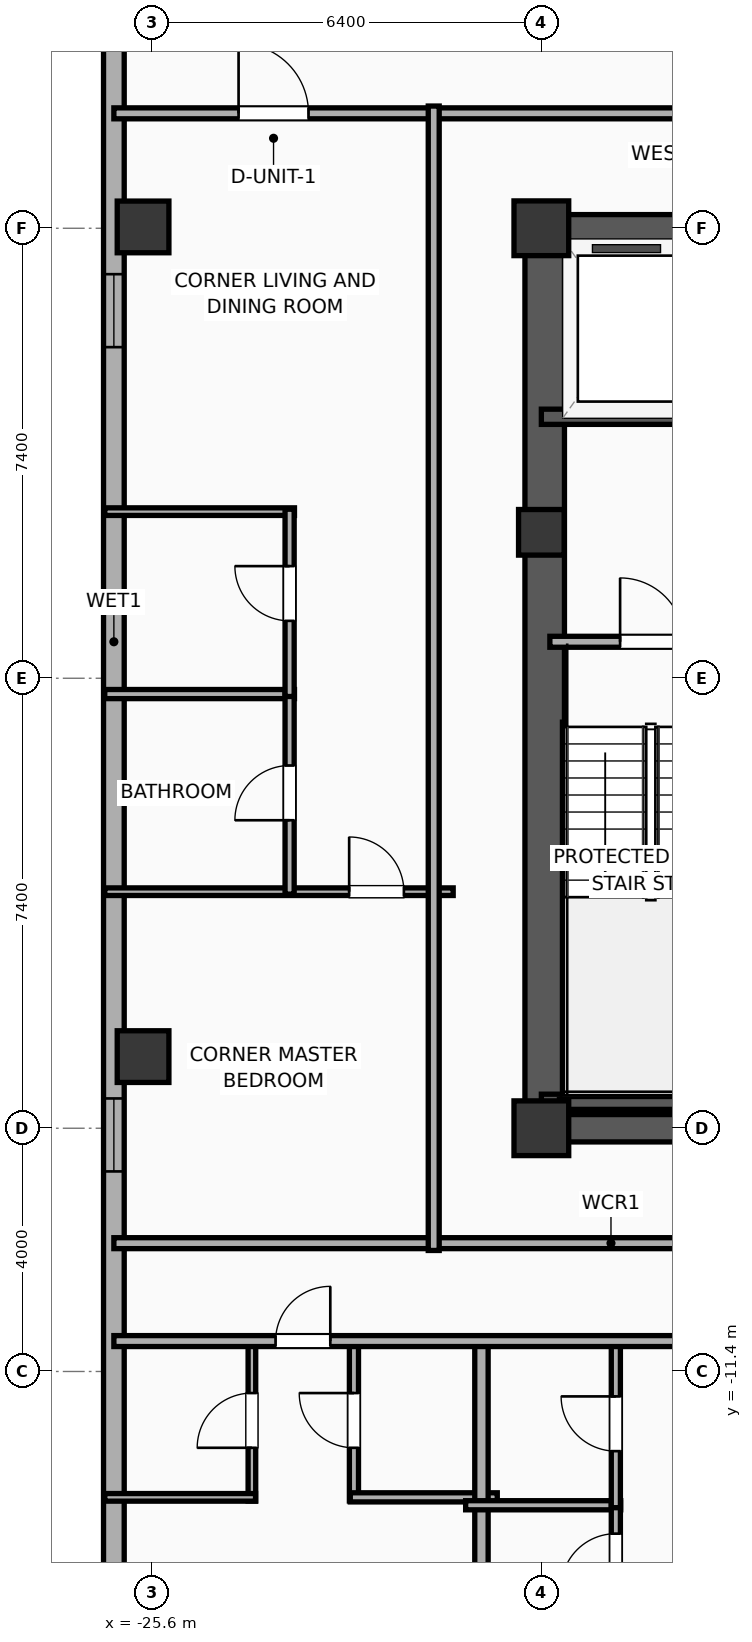
"""IFC4 building model, lengths in metres.
Left out: names, types, materials, properties, quantities, classifications, styles, units other than length and angle.
Written with IfcOpenShell. Run it as: python <this file> out.ifc"""

import sys

from ifc_helpers import new_model, si_unit, direction, frame, frame_2d, origin, origin_2d, place, context, subcontext, project, spatial, rectangle, hollow_rectangle, extrude, element, fill, save


model = new_model("IFC4")
c1 = context("Model", 3, precision=1e-05, world=origin(), true_north=direction((0.0, 1.0)))
c2 = subcontext(c1, "Body", "Model", "MODEL_VIEW")
j1 = project(units=[si_unit("LENGTHUNIT", "METRE"), si_unit("PLANEANGLEUNIT", "RADIAN")], contexts=[c1])
p1 = place(None, origin())
s1 = spatial("IfcSite", under=j1, at=p1, CompositionType="ELEMENT")
p2 = place(p1, origin())
s2 = spatial("IfcBuilding", under=s1, at=p2, CompositionType="ELEMENT")
p3 = place(p2, frame((0.0, 0.0, 243.1)))
s3 = spatial("IfcBuildingStorey", under=s2, at=p3, CompositionType="ELEMENT", Elevation=243.1)
p4 = place(p3, frame((-19.2, -7.4, 0.0), z_axis=(0.0, 0.0, 1.0), x_axis=(1.0, 0.0, 0.0)))
e1 = element("IfcColumn", 1, at=p4, inside=s3, PredefinedType="COLUMN", context=c2, shape_type="SweptSolid", body=[
    extrude(rectangle(XDim=0.9, YDim=0.9, at=origin_2d()), origin(), (0.0, 0.0, 1.0), 3.9),
])
p5 = place(p3, frame((-19.2, 2.4, 0.0), z_axis=(0.0, 0.0, 1.0), x_axis=(1.0, 0.0, 0.0)))
e2 = element("IfcColumn", 2, at=p5, inside=s3, PredefinedType="COLUMN", context=c2, shape_type="SweptSolid", body=[
    extrude(rectangle(XDim=0.75, YDim=0.75, at=origin_2d()), origin(), (0.0, 0.0, 1.0), 3.9),
])
p6 = place(p3, frame((-19.2, 7.4, 0.0), z_axis=(0.0, 0.0, 1.0), x_axis=(1.0, 0.0, 0.0)))
e3 = element("IfcColumn", 3, at=p6, inside=s3, PredefinedType="COLUMN", context=c2, shape_type="SweptSolid", body=[
    extrude(rectangle(XDim=0.9, YDim=0.9, at=origin_2d()), origin(), (0.0, 0.0, 1.0), 3.9),
])
for number, where, z_axis, x_axis in (
    (4, (-19.425, -7.4, 0.0), (0.0, 0.0, 1.0), (1.0, 0.0, 0.0)),
    (5, (-19.425, 7.4, 0.0), (0.0, 0.0, 1.0), (1.0, 0.0, 0.0)),
):
    element("IfcWall", number, at=place(p3, frame(where, z_axis=z_axis, x_axis=x_axis)), inside=s3, PredefinedType="SHEAR", context=c2, shape_type="SweptSolid", body=[
        extrude(rectangle(XDim=7.25, YDim=0.45, at=frame_2d((3.625, 0.0))), origin(), (0.0, 0.0, 1.0), 3.65),
    ])
p7 = place(p3, frame((-19.145, -7.4, 0.0), z_axis=(0.0, 0.0, 1.0), x_axis=(0.0, 1.0, 0.0)))
e6 = element("IfcWall", 6, at=p7, inside=s3, PredefinedType="SHEAR", context=c2, shape_type="SweptSolid", body=[
    extrude(rectangle(XDim=14.8, YDim=0.65, at=frame_2d((7.4, 0.0))), origin(), (0.0, 0.0, 1.0), 3.65),
])
p8 = place(p3, frame((-19.2, -6.965, 0.0), z_axis=(0.0, 0.0, 1.0), x_axis=(1.0, 0.0, 0.0)))
e7 = element("IfcWall", 7, at=p8, inside=s3, PredefinedType="SOLIDWALL", context=c2, shape_type="SweptSolid", body=[
    extrude(rectangle(XDim=3.46, YDim=0.25, at=frame_2d((1.73, 0.0))), origin(), (0.0, 0.0, 1.0), 3.65),
])
for number, where, z_axis, x_axis in (
    (8, (-25.75, 7.422, 0.0), (0.0, 0.0, 1.0), (1.0, 0.0, 0.0)),
    (9, (-25.75, -6.222, 0.0), (0.0, 0.0, 1.0), (1.0, 0.0, 0.0)),
):
    element("IfcColumn", number, at=place(p3, frame(where, z_axis=z_axis, x_axis=x_axis)), inside=s3, PredefinedType="COLUMN", context=c2, shape_type="SweptSolid", body=[
        extrude(hollow_rectangle(XDim=0.85, YDim=0.85, WallThickness=0.028, at=origin_2d()), origin(), (0.0, 0.0, 1.0), 3.9),
    ])
p9 = place(p3, frame((-26.23, -15.383, 0.0), z_axis=(0.0, 0.0, 1.0), x_axis=(0.0, 1.0, 0.0)))
e10 = element("IfcWall", 10, at=p9, inside=s3, PredefinedType="ELEMENTEDWALL", context=c2, shape_type="SweptSolid", body=[
    extrude(rectangle(XDim=31.967, YDim=0.34, at=frame_2d((15.983, 0.0))), origin(), (0.0, 0.0, 1.0), 3.65),
])
p10 = place(p9, frame((29.36, 0.0, 0.75)))
e11 = element("IfcOpeningElement", 11, at=p10, cuts=e10, PredefinedType="OPENING", context=c2, shape_type="SweptSolid", body=[
    extrude(rectangle(XDim=1.2, YDim=2.05, at=frame_2d((0.6, 1.025))), frame((0.0, 0.18, 0.0), z_axis=(0.0, -1.0, 0.0), x_axis=(1.0, 0.0, 0.0)), (0.0, 0.0, 1.0), 0.36),
])
p11 = place(p9, frame((20.828, 0.0, 0.75)))
e12 = element("IfcOpeningElement", 12, at=p11, cuts=e10, PredefinedType="OPENING", context=c2, shape_type="SweptSolid", body=[
    extrude(rectangle(XDim=1.2, YDim=2.05, at=frame_2d((0.6, 1.025))), frame((0.0, 0.18, 0.0), z_axis=(0.0, -1.0, 0.0), x_axis=(1.0, 0.0, 0.0)), (0.0, 0.0, 1.0), 0.36),
])
p12 = place(p9, frame((7.273, 0.0, 0.75)))
e13 = element("IfcOpeningElement", 13, at=p12, cuts=e10, PredefinedType="OPENING", context=c2, shape_type="SweptSolid", body=[
    extrude(rectangle(XDim=1.2, YDim=2.05, at=frame_2d((0.6, 1.025))), frame((0.0, 0.18, 0.0), z_axis=(0.0, -1.0, 0.0), x_axis=(1.0, 0.0, 0.0)), (0.0, 0.0, 1.0), 0.36),
])
p13 = place(p3, frame((-19.2, 4.3, 0.0), z_axis=(0.0, 0.0, 1.0), x_axis=(1.0, 0.0, 0.0)))
e14 = element("IfcWall", 14, at=p13, inside=s3, PredefinedType="SOLIDWALL", context=c2, shape_type="SweptSolid", body=[
    extrude(rectangle(XDim=2.6, YDim=0.25, at=frame_2d((1.3, 0.0))), origin(), (0.0, 0.0, 1.0), 3.65),
])
p14 = place(p3, frame((-19.06, 0.6, 0.0), z_axis=(0.0, 0.0, 1.0), x_axis=(1.0, 0.0, 0.0)))
e15 = element("IfcWall", 15, at=p14, inside=s3, PredefinedType="PARTITIONING", context=c2, shape_type="SweptSolid", body=[
    extrude(rectangle(XDim=3.36, YDim=0.18, at=frame_2d((1.68, 0.0))), origin(), (0.0, 0.0, 1.0), 3.65),
])
p15 = place(p14, frame((1.155, 0.0, 0.0)))
e16 = element("IfcOpeningElement", 16, at=p15, cuts=e15, PredefinedType="OPENING", context=c2, shape_type="SweptSolid", body=[
    extrude(rectangle(XDim=1.05, YDim=2.05, at=frame_2d((0.525, 1.025))), frame((0.0, 0.1, 0.0), z_axis=(0.0, -1.0, 0.0), x_axis=(1.0, 0.0, 0.0)), (0.0, 0.0, 1.0), 0.2),
])
p16 = place(p3, frame((-26.23, 9.29, 0.0), z_axis=(0.0, 0.0, 1.0), x_axis=(1.0, 0.0, 0.0)))
e17 = element("IfcWall", 17, at=p16, inside=s3, PredefinedType="PARTITIONING", context=c2, shape_type="SweptSolid", body=[
    extrude(rectangle(XDim=16.35, YDim=0.18, at=frame_2d((8.175, 0.0))), origin(), (0.0, 0.0, 1.0), 3.65),
])
p17 = place(p16, frame((2.051, 0.0, 0.0)))
e18 = element("IfcOpeningElement", 18, at=p17, cuts=e17, PredefinedType="OPENING", context=c2, shape_type="SweptSolid", body=[
    extrude(rectangle(XDim=1.15, YDim=2.05, at=frame_2d((0.575, 1.025))), frame((0.0, 0.1, 0.0), z_axis=(0.0, -1.0, 0.0), x_axis=(1.0, 0.0, 0.0)), (0.0, 0.0, 1.0), 0.2),
])
p18 = place(p3, frame((-26.23, -9.29, 0.0), z_axis=(0.0, 0.0, 1.0), x_axis=(1.0, 0.0, 0.0)))
e19 = element("IfcWall", 19, at=p18, inside=s3, PredefinedType="PARTITIONING", context=c2, shape_type="SweptSolid", body=[
    extrude(rectangle(XDim=16.35, YDim=0.18, at=frame_2d((8.175, 0.0))), origin(), (0.0, 0.0, 1.0), 3.65),
])
p19 = place(p3, frame((-23.96, -13.53, 0.0), z_axis=(0.0, 0.0, 1.0), x_axis=(0.0, 1.0, 0.0)))
e20 = element("IfcWall", 20, at=p19, inside=s3, PredefinedType="PARTITIONING", context=c2, shape_type="SweptSolid", body=[
    extrude(rectangle(XDim=2.65, YDim=0.125, at=frame_2d((1.325, 0.0))), origin(), (0.0, 0.0, 1.0), 3.65),
])
p20 = place(p19, frame((0.875, 0.0, 0.0)))
e21 = element("IfcOpeningElement", 21, at=p20, cuts=e20, PredefinedType="OPENING", context=c2, shape_type="SweptSolid", body=[
    extrude(rectangle(XDim=0.9, YDim=2.05, at=frame_2d((0.45, 1.025))), frame((0.0, 0.073, 0.0), z_axis=(0.0, -1.0, 0.0), x_axis=(1.0, 0.0, 0.0)), (0.0, 0.0, 1.0), 0.145),
])
p21 = place(p3, frame((-22.282, -13.53, 0.0), z_axis=(0.0, 0.0, 1.0), x_axis=(0.0, 1.0, 0.0)))
e22 = element("IfcWall", 22, at=p21, inside=s3, PredefinedType="PLUMBINGWALL", context=c2, shape_type="SweptSolid", body=[
    extrude(rectangle(XDim=2.65, YDim=0.15, at=frame_2d((1.325, 0.0))), origin(), (0.0, 0.0, 1.0), 3.65),
])
p22 = place(p21, frame((0.875, 0.0, 0.0)))
e23 = element("IfcOpeningElement", 23, at=p22, cuts=e22, PredefinedType="OPENING", context=c2, shape_type="SweptSolid", body=[
    extrude(rectangle(XDim=0.9, YDim=2.05, at=frame_2d((0.45, 1.025))), frame((0.0, 0.085, 0.0), z_axis=(0.0, -1.0, 0.0), x_axis=(1.0, 0.0, 0.0)), (0.0, 0.0, 1.0), 0.17),
])
p23 = place(p3, frame((-26.38, -13.47, 0.0), z_axis=(0.0, 0.0, 1.0), x_axis=(1.0, 0.0, 0.0)))
e24 = element("IfcWall", 24, at=p23, inside=s3, PredefinedType="PARTITIONING", context=c2, shape_type="SweptSolid", body=[
    extrude(rectangle(XDim=2.48, YDim=0.125, at=frame_2d((1.24, 0.0))), origin(), (0.0, 0.0, 1.0), 3.65),
])
p24 = place(p3, frame((-22.342, -13.47, 0.0), z_axis=(0.0, 0.0, 1.0), x_axis=(1.0, 0.0, 0.0)))
e25 = element("IfcWall", 25, at=p24, inside=s3, PredefinedType="PLUMBINGWALL", context=c2, shape_type="SweptSolid", body=[
    extrude(rectangle(XDim=2.417, YDim=0.15, at=frame_2d((1.208, 0.0))), origin(), (0.0, 0.0, 1.0), 3.65),
])
p25 = place(p3, frame((-20.185, -18.83, 0.0), z_axis=(0.0, 0.0, 1.0), x_axis=(0.0, 1.0, 0.0)))
e26 = element("IfcWall", 26, at=p25, inside=s3, PredefinedType="PARTITIONING", context=c2, shape_type="SweptSolid", body=[
    extrude(rectangle(XDim=8.01, YDim=0.22, at=frame_2d((4.005, 0.0))), origin(), (0.0, 0.0, 1.0), 3.65),
])
p26 = place(p3, frame((-20.445, -13.6, 0.0), z_axis=(0.0, 0.0, 1.0), x_axis=(1.0, 0.0, 0.0)))
e27 = element("IfcWall", 27, at=p26, inside=s3, PredefinedType="PLUMBINGWALL", context=c2, shape_type="SweptSolid", body=[
    extrude(rectangle(XDim=2.55, YDim=0.15, at=frame_2d((1.275, 0.0))), origin(), (0.0, 0.0, 1.0), 3.65),
])
p27 = place(p3, frame((-17.975, -18.877, 0.0), z_axis=(0.0, 0.0, 1.0), x_axis=(0.0, 1.0, 0.0)))
e28 = element("IfcWall", 28, at=p27, inside=s3, PredefinedType="PLUMBINGWALL", context=c2, shape_type="SweptSolid", body=[
    extrude(rectangle(XDim=5.317, YDim=0.15, at=frame_2d((2.658, 0.0))), origin(), (0.0, 0.0, 1.0), 3.65),
])
p28 = place(p27, frame((3.91, 0.0, 0.0)))
e29 = element("IfcOpeningElement", 29, at=p28, cuts=e28, PredefinedType="OPENING", context=c2, shape_type="SweptSolid", body=[
    extrude(rectangle(XDim=0.9, YDim=2.05, at=frame_2d((0.45, 1.025))), frame((0.0, 0.085, 0.0), z_axis=(0.0, -1.0, 0.0), x_axis=(1.0, 0.0, 0.0)), (0.0, 0.0, 1.0), 0.17),
])
p29 = place(p3, frame((-17.975, -13.64, 0.0), z_axis=(0.0, 0.0, 1.0), x_axis=(0.0, 1.0, 0.0)))
e30 = element("IfcWall", 30, at=p29, inside=s3, PredefinedType="PLUMBINGWALL", context=c2, shape_type="SweptSolid", body=[
    extrude(rectangle(XDim=2.76, YDim=0.15, at=frame_2d((1.38, 0.0))), origin(), (0.0, 0.0, 1.0), 3.65),
])
p30 = place(p29, frame((0.93, 0.0, 0.0)))
e31 = element("IfcOpeningElement", 31, at=p30, cuts=e30, PredefinedType="OPENING", context=c2, shape_type="SweptSolid", body=[
    extrude(rectangle(XDim=0.9, YDim=2.05, at=frame_2d((0.45, 1.025))), frame((0.0, 0.085, 0.0), z_axis=(0.0, -1.0, 0.0), x_axis=(1.0, 0.0, 0.0)), (0.0, 0.0, 1.0), 0.17),
])
p31 = place(p3, frame((-26.23, -10.9, 0.0), z_axis=(0.0, 0.0, 1.0), x_axis=(1.0, 0.0, 0.0)))
e32 = element("IfcWall", 32, at=p31, inside=s3, PredefinedType="PARTITIONING", context=c2, shape_type="SweptSolid", body=[
    extrude(rectangle(XDim=18.15, YDim=0.18, at=frame_2d((9.075, 0.0))), origin(), (0.0, 0.0, 1.0), 3.65),
])
p32 = place(p31, frame((2.659, 0.0, 0.0)))
e33 = element("IfcOpeningElement", 33, at=p32, cuts=e32, PredefinedType="OPENING", context=c2, shape_type="SweptSolid", body=[
    extrude(rectangle(XDim=0.9, YDim=2.05, at=frame_2d((0.45, 1.025))), frame((0.0, 0.1, 0.0), z_axis=(0.0, -1.0, 0.0), x_axis=(1.0, 0.0, 0.0)), (0.0, 0.0, 1.0), 0.2),
])
p33 = place(p31, frame((9.571, 0.0, 0.0)))
e34 = element("IfcOpeningElement", 34, at=p33, cuts=e32, PredefinedType="OPENING", context=c2, shape_type="SweptSolid", body=[
    extrude(rectangle(XDim=1.15, YDim=2.05, at=frame_2d((0.575, 1.025))), frame((0.0, 0.1, 0.0), z_axis=(0.0, -1.0, 0.0), x_axis=(1.0, 0.0, 0.0)), (0.0, 0.0, 1.0), 0.2),
])
p34 = place(p31, frame((14.792, 0.0, 0.0)))
e35 = element("IfcOpeningElement", 35, at=p34, cuts=e32, PredefinedType="OPENING", context=c2, shape_type="SweptSolid", body=[
    extrude(rectangle(XDim=0.9, YDim=2.05, at=frame_2d((0.45, 1.025))), frame((0.0, 0.1, 0.0), z_axis=(0.0, -1.0, 0.0), x_axis=(1.0, 0.0, 0.0)), (0.0, 0.0, 1.0), 0.2),
])
p35 = place(p3, frame((-26.38, 2.74, 0.0), z_axis=(0.0, 0.0, 1.0), x_axis=(1.0, 0.0, 0.0)))
e36 = element("IfcWall", 36, at=p35, inside=s3, PredefinedType="PARTITIONING", context=c2, shape_type="SweptSolid", body=[
    extrude(rectangle(XDim=3.12, YDim=0.125, at=frame_2d((1.56, 0.0))), origin(), (0.0, 0.0, 1.0), 3.65),
])
p36 = place(p3, frame((-26.38, -0.26, 0.0), z_axis=(0.0, 0.0, 1.0), x_axis=(1.0, 0.0, 0.0)))
e37 = element("IfcWall", 37, at=p36, inside=s3, PredefinedType="PLUMBINGWALL", context=c2, shape_type="SweptSolid", body=[
    extrude(rectangle(XDim=3.12, YDim=0.15, at=frame_2d((1.56, 0.0))), origin(), (0.0, 0.0, 1.0), 3.65),
])
p37 = place(p3, frame((-26.38, -3.51, 0.0), z_axis=(0.0, 0.0, 1.0), x_axis=(1.0, 0.0, 0.0)))
e38 = element("IfcWall", 38, at=p37, inside=s3, PredefinedType="PARTITIONING", context=c2, shape_type="SweptSolid", body=[
    extrude(rectangle(XDim=5.73, YDim=0.125, at=frame_2d((2.865, 0.0))), origin(), (0.0, 0.0, 1.0), 3.65),
])
p38 = place(p37, frame((4.019, 0.0, 0.0)))
e39 = element("IfcOpeningElement", 39, at=p38, cuts=e38, PredefinedType="OPENING", context=c2, shape_type="SweptSolid", body=[
    extrude(rectangle(XDim=0.9, YDim=2.05, at=frame_2d((0.45, 1.025))), frame((0.0, 0.073, 0.0), z_axis=(0.0, -1.0, 0.0), x_axis=(1.0, 0.0, 0.0)), (0.0, 0.0, 1.0), 0.145),
])
p39 = place(p3, frame((-23.34, -3.55, 0.0), z_axis=(0.0, 0.0, 1.0), x_axis=(0.0, 1.0, 0.0)))
e40 = element("IfcWall", 40, at=p39, inside=s3, PredefinedType="PLUMBINGWALL", context=c2, shape_type="SweptSolid", body=[
    extrude(rectangle(XDim=3.33, YDim=0.15, at=frame_2d((1.665, 0.0))), origin(), (0.0, 0.0, 1.0), 3.65),
])
p40 = place(p39, frame((1.215, 0.0, 0.0)))
e41 = element("IfcOpeningElement", 41, at=p40, cuts=e40, PredefinedType="OPENING", context=c2, shape_type="SweptSolid", body=[
    extrude(rectangle(XDim=0.9, YDim=2.05, at=frame_2d((0.45, 1.025))), frame((0.0, 0.085, 0.0), z_axis=(0.0, -1.0, 0.0), x_axis=(1.0, 0.0, 0.0)), (0.0, 0.0, 1.0), 0.17),
])
p41 = place(p3, frame((-23.34, -0.3, 0.0), z_axis=(0.0, 0.0, 1.0), x_axis=(0.0, 1.0, 0.0)))
e42 = element("IfcWall", 42, at=p41, inside=s3, PredefinedType="PLUMBINGWALL", context=c2, shape_type="SweptSolid", body=[
    extrude(rectangle(XDim=3.08, YDim=0.15, at=frame_2d((1.54, 0.0))), origin(), (0.0, 0.0, 1.0), 3.65),
])
p42 = place(p41, frame((1.244, 0.0, 0.0)))
e43 = element("IfcOpeningElement", 43, at=p42, cuts=e42, PredefinedType="OPENING", context=c2, shape_type="SweptSolid", body=[
    extrude(rectangle(XDim=0.9, YDim=2.05, at=frame_2d((0.45, 1.025))), frame((0.0, 0.085, 0.0), z_axis=(0.0, -1.0, 0.0), x_axis=(1.0, 0.0, 0.0)), (0.0, 0.0, 1.0), 0.17),
])
p43 = place(p3, frame((-20.97, -9.41, 0.0), z_axis=(0.0, 0.0, 1.0), x_axis=(0.0, 1.0, 0.0)))
e44 = element("IfcWall", 44, at=p43, inside=s3, PredefinedType="PARTITIONING", context=c2, shape_type="SweptSolid", body=[
    extrude(rectangle(XDim=18.82, YDim=0.18, at=frame_2d((9.41, 0.0))), origin(), (0.0, 0.0, 1.0), 3.65),
])
p44 = place(p11, origin())
e45 = element("IfcWindow", 45, at=p44, inside=s3, PartitioningType="SINGLE_PANEL", PredefinedType="WINDOW", context=c2, shape_type="SweptSolid", body=[
    extrude(rectangle(XDim=1.2, YDim=2.05, at=frame_2d((0.6, 1.025))), frame((0.0, 0.03, 0.0), z_axis=(0.0, -1.0, 0.0), x_axis=(1.0, 0.0, 0.0)), (0.0, 0.0, 1.0), 0.06),
])
fill(e12, e45)
p45 = place(p12, origin())
e46 = element("IfcWindow", 46, at=p45, inside=s3, PartitioningType="SINGLE_PANEL", PredefinedType="WINDOW", context=c2, shape_type="SweptSolid", body=[
    extrude(rectangle(XDim=1.2, YDim=2.05, at=frame_2d((0.6, 1.025))), frame((0.0, 0.03, 0.0), z_axis=(0.0, -1.0, 0.0), x_axis=(1.0, 0.0, 0.0)), (0.0, 0.0, 1.0), 0.06),
])
fill(e13, e46)
p46 = place(p15, origin())
e47 = element("IfcDoor", 47, at=p46, inside=s3, OperationType="SINGLE_SWING_LEFT", PredefinedType="DOOR", context=c2, shape_type="SweptSolid", body=[
    extrude(rectangle(XDim=1.05, YDim=2.05, at=frame_2d((0.525, 1.025))), frame((0.0, 0.025, 0.0), z_axis=(0.0, -1.0, 0.0), x_axis=(1.0, 0.0, 0.0)), (0.0, 0.0, 1.0), 0.05),
])
fill(e16, e47)
p47 = place(p17, origin())
e48 = element("IfcDoor", 48, at=p47, inside=s3, OperationType="SINGLE_SWING_LEFT", PredefinedType="DOOR", context=c2, shape_type="SweptSolid", body=[
    extrude(rectangle(XDim=1.15, YDim=2.05, at=frame_2d((0.575, 1.025))), frame((0.0, 0.025, 0.0), z_axis=(0.0, -1.0, 0.0), x_axis=(1.0, 0.0, 0.0)), (0.0, 0.0, 1.0), 0.05),
])
fill(e18, e48)
p48 = place(p20, origin())
e49 = element("IfcDoor", 49, at=p48, inside=s3, OperationType="SINGLE_SWING_LEFT", PredefinedType="DOOR", context=c2, shape_type="SweptSolid", body=[
    extrude(rectangle(XDim=0.9, YDim=2.05, at=frame_2d((0.45, 1.025))), frame((0.0, 0.025, 0.0), z_axis=(0.0, -1.0, 0.0), x_axis=(1.0, 0.0, 0.0)), (0.0, 0.0, 1.0), 0.05),
])
fill(e21, e49)
p49 = place(p22, origin())
e50 = element("IfcDoor", 50, at=p49, inside=s3, OperationType="SINGLE_SWING_RIGHT", PredefinedType="DOOR", context=c2, shape_type="SweptSolid", body=[
    extrude(rectangle(XDim=0.9, YDim=2.05, at=frame_2d((0.45, 1.025))), frame((0.0, 0.025, 0.0), z_axis=(0.0, -1.0, 0.0), x_axis=(1.0, 0.0, 0.0)), (0.0, 0.0, 1.0), 0.05),
])
fill(e23, e50)
p50 = place(p28, origin())
e51 = element("IfcDoor", 51, at=p50, inside=s3, OperationType="SINGLE_SWING_LEFT", PredefinedType="DOOR", context=c2, shape_type="SweptSolid", body=[
    extrude(rectangle(XDim=0.9, YDim=2.05, at=frame_2d((0.45, 1.025))), frame((0.0, 0.025, 0.0), z_axis=(0.0, -1.0, 0.0), x_axis=(1.0, 0.0, 0.0)), (0.0, 0.0, 1.0), 0.05),
])
fill(e29, e51)
p51 = place(p30, origin())
e52 = element("IfcDoor", 52, at=p51, inside=s3, OperationType="SINGLE_SWING_RIGHT", PredefinedType="DOOR", context=c2, shape_type="SweptSolid", body=[
    extrude(rectangle(XDim=0.9, YDim=2.05, at=frame_2d((0.45, 1.025))), frame((0.0, 0.025, 0.0), z_axis=(0.0, -1.0, 0.0), x_axis=(1.0, 0.0, 0.0)), (0.0, 0.0, 1.0), 0.05),
])
fill(e31, e52)
p52 = place(p32, origin())
e53 = element("IfcDoor", 53, at=p52, inside=s3, OperationType="SINGLE_SWING_RIGHT", PredefinedType="DOOR", context=c2, shape_type="SweptSolid", body=[
    extrude(rectangle(XDim=0.9, YDim=2.05, at=frame_2d((0.45, 1.025))), frame((0.0, 0.025, 0.0), z_axis=(0.0, -1.0, 0.0), x_axis=(1.0, 0.0, 0.0)), (0.0, 0.0, 1.0), 0.05),
])
fill(e33, e53)
p53 = place(p38, origin())
e54 = element("IfcDoor", 54, at=p53, inside=s3, OperationType="SINGLE_SWING_LEFT", PredefinedType="DOOR", context=c2, shape_type="SweptSolid", body=[
    extrude(rectangle(XDim=0.9, YDim=2.05, at=frame_2d((0.45, 1.025))), frame((0.0, 0.025, 0.0), z_axis=(0.0, -1.0, 0.0), x_axis=(1.0, 0.0, 0.0)), (0.0, 0.0, 1.0), 0.05),
])
fill(e39, e54)
p54 = place(p40, origin())
e55 = element("IfcDoor", 55, at=p54, inside=s3, OperationType="SINGLE_SWING_LEFT", PredefinedType="DOOR", context=c2, shape_type="SweptSolid", body=[
    extrude(rectangle(XDim=0.9, YDim=2.05, at=frame_2d((0.45, 1.025))), frame((0.0, 0.025, 0.0), z_axis=(0.0, -1.0, 0.0), x_axis=(1.0, 0.0, 0.0)), (0.0, 0.0, 1.0), 0.05),
])
fill(e41, e55)
p55 = place(p42, origin())
e56 = element("IfcDoor", 56, at=p55, inside=s3, OperationType="SINGLE_SWING_RIGHT", PredefinedType="DOOR", context=c2, shape_type="SweptSolid", body=[
    extrude(rectangle(XDim=0.9, YDim=2.05, at=frame_2d((0.45, 1.025))), frame((0.0, 0.025, 0.0), z_axis=(0.0, -1.0, 0.0), x_axis=(1.0, 0.0, 0.0)), (0.0, 0.0, 1.0), 0.05),
])
fill(e43, e56)
save(model, sys.argv[1])
